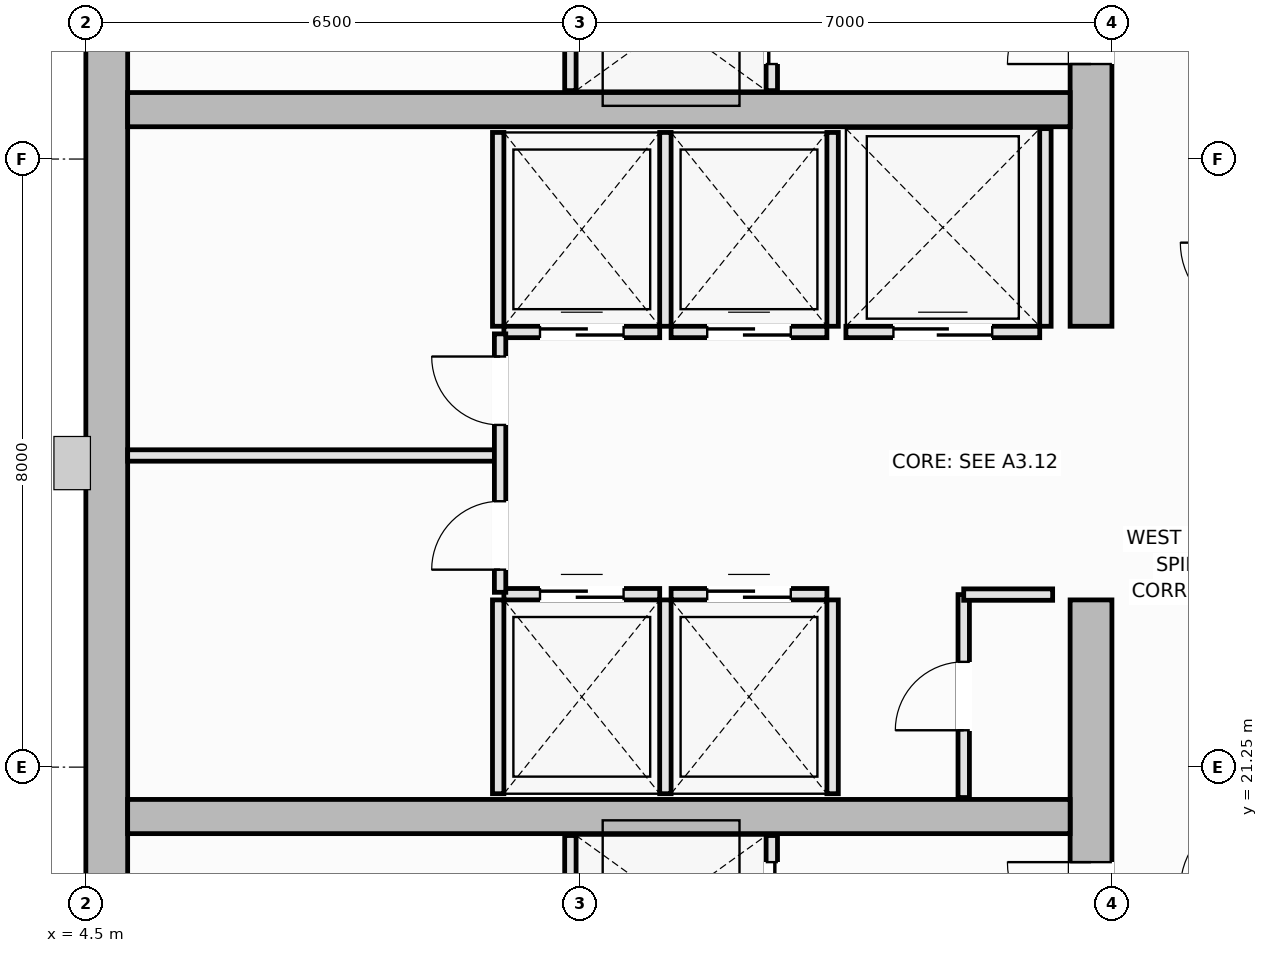
"""IFC4 building model, lengths in metres.
Left out: names, types, materials, properties, quantities, classifications, styles, units other than length and angle.
Written with IfcOpenShell. Run it as: python <this file> out.ifc"""

import sys

from ifc_helpers import new_model, si_unit, direction, frame, frame_2d, origin, place, context, subcontext, project, spatial, rectangle, extrude, element, fill, save


model = new_model("IFC4")
c1 = context("Model", 3, precision=1e-05, world=origin(), true_north=direction((0.0, 1.0)))
c2 = subcontext(c1, "Body", "Model", "MODEL_VIEW")
j1 = project(units=[si_unit("LENGTHUNIT", "METRE"), si_unit("PLANEANGLEUNIT", "RADIAN")], contexts=[c1])
p1 = place(None, origin())
s1 = spatial("IfcSite", under=j1, at=p1, CompositionType="ELEMENT")
p2 = place(p1, origin())
s2 = spatial("IfcBuilding", under=s1, at=p2, CompositionType="ELEMENT")
p3 = place(p2, frame((0.0, 0.0, 191.6)))
s3 = spatial("IfcBuildingStorey", under=s2, at=p3, CompositionType="ELEMENT", Elevation=191.6)
p4 = place(p3, frame((4.775, 14.55, 0.0), z_axis=(0.0, 0.0, 1.0), x_axis=(0.0, 1.0, 0.0)))
e1 = element("IfcWall", 1, at=p4, inside=s3, PredefinedType="SHEAR", context=c2, shape_type="SweptSolid", body=[
    extrude(rectangle(XDim=21.4, YDim=0.55, at=frame_2d((10.7, 0.0))), origin(), (0.0, 0.0, 1.0), 3.55),
])
p5 = place(p3, frame((17.725, 14.55, 0.0), z_axis=(0.0, 0.0, 1.0), x_axis=(0.0, 1.0, 0.0)))
e2 = element("IfcWall", 2, at=p5, inside=s3, PredefinedType="SHEAR", context=c2, shape_type="SweptSolid", body=[
    extrude(rectangle(XDim=8.9, YDim=0.55, at=frame_2d((4.45, 0.0))), origin(), (0.0, 0.0, 1.0), 3.55),
])
p6 = place(p5, frame((4.35, 0.0, 0.0)))
e3 = element("IfcOpeningElement", 3, at=p6, cuts=e2, PredefinedType="OPENING", context=c2, shape_type="SweptSolid", body=[
    extrude(rectangle(XDim=1.1, YDim=2.15, at=frame_2d((0.55, 1.075))), frame((0.0, 0.285, 0.0), z_axis=(0.0, -1.0, 0.0), x_axis=(1.0, 0.0, 0.0)), (0.0, 0.0, 1.0), 0.57),
])
p7 = place(p3, frame((17.725, 27.05, 0.0), z_axis=(0.0, 0.0, 1.0), x_axis=(0.0, 1.0, 0.0)))
e4 = element("IfcWall", 4, at=p7, inside=s3, PredefinedType="SHEAR", context=c2, shape_type="SweptSolid", body=[
    extrude(rectangle(XDim=8.9, YDim=0.55, at=frame_2d((4.45, 0.0))), origin(), (0.0, 0.0, 1.0), 3.55),
])
p8 = place(p7, frame((3.45, 0.0, 0.0)))
e5 = element("IfcOpeningElement", 5, at=p8, cuts=e4, PredefinedType="OPENING", context=c2, shape_type="SweptSolid", body=[
    extrude(rectangle(XDim=1.1, YDim=2.15, at=frame_2d((0.55, 1.075))), frame((0.0, 0.285, 0.0), z_axis=(0.0, -1.0, 0.0), x_axis=(1.0, 0.0, 0.0)), (0.0, 0.0, 1.0), 0.57),
])
for number, where, z_axis, x_axis in (
    (6, (5.05, 20.6, 0.0), (0.0, 0.0, 1.0), (1.0, 0.0, 0.0)),
    (7, (5.05, 29.9, 0.0), (0.0, 0.0, 1.0), (1.0, 0.0, 0.0)),
):
    element("IfcWall", number, at=place(p3, frame(where, z_axis=z_axis, x_axis=x_axis)), inside=s3, PredefinedType="SHEAR", context=c2, shape_type="SweptSolid", body=[
        extrude(rectangle(XDim=12.4, YDim=0.45, at=frame_2d((6.2, 0.0))), origin(), (0.0, 0.0, 1.0), 3.55),
    ])
p9 = place(p3, frame((10.0, 23.525, 0.0), z_axis=(0.0, 0.0, 1.0), x_axis=(1.0, 0.0, 0.0)))
e8 = element("IfcWall", 8, at=p9, inside=s3, PredefinedType="PARTITIONING", context=c2, shape_type="SweptSolid", body=[
    extrude(rectangle(XDim=2.05, YDim=0.15, at=frame_2d((1.025, 0.0))), origin(), (0.0, 0.0, 1.0), 3.37),
])
p10 = place(p9, frame((0.475, 0.0, 0.0)))
e9 = element("IfcOpeningElement", 9, at=p10, cuts=e8, PredefinedType="OPENING", context=c2, shape_type="SweptSolid", body=[
    extrude(rectangle(XDim=1.1, YDim=2.2, at=frame_2d((0.55, 1.1))), frame((0.0, 0.085, 0.0), z_axis=(0.0, -1.0, 0.0), x_axis=(1.0, 0.0, 0.0)), (0.0, 0.0, 1.0), 0.17),
])
for number, where, z_axis, x_axis in (
    (10, (9.925, 20.9, 0.0), (0.0, 0.0, 1.0), (0.0, 1.0, 0.0)),
    (11, (12.125, 20.9, 0.0), (0.0, 0.0, 1.0), (0.0, 1.0, 0.0)),
):
    element("IfcWall", number, at=place(p3, frame(where, z_axis=z_axis, x_axis=x_axis)), inside=s3, PredefinedType="PARTITIONING", context=c2, shape_type="SweptSolid", body=[
        extrude(rectangle(XDim=2.55, YDim=0.15, at=frame_2d((1.275, 0.0))), origin(), (0.0, 0.0, 1.0), 3.37),
    ])
p11 = place(p3, frame((12.2, 23.525, 0.0), z_axis=(0.0, 0.0, 1.0), x_axis=(1.0, 0.0, 0.0)))
e12 = element("IfcWall", 12, at=p11, inside=s3, PredefinedType="PARTITIONING", context=c2, shape_type="SweptSolid", body=[
    extrude(rectangle(XDim=2.05, YDim=0.15, at=frame_2d((1.025, 0.0))), origin(), (0.0, 0.0, 1.0), 3.37),
])
p12 = place(p11, frame((0.475, 0.0, 0.0)))
e13 = element("IfcOpeningElement", 13, at=p12, cuts=e12, PredefinedType="OPENING", context=c2, shape_type="SweptSolid", body=[
    extrude(rectangle(XDim=1.1, YDim=2.2, at=frame_2d((0.55, 1.1))), frame((0.0, 0.085, 0.0), z_axis=(0.0, -1.0, 0.0), x_axis=(1.0, 0.0, 0.0)), (0.0, 0.0, 1.0), 0.17),
])
p13 = place(p3, frame((14.325, 20.9, 0.0), z_axis=(0.0, 0.0, 1.0), x_axis=(0.0, 1.0, 0.0)))
e14 = element("IfcWall", 14, at=p13, inside=s3, PredefinedType="PARTITIONING", context=c2, shape_type="SweptSolid", body=[
    extrude(rectangle(XDim=2.55, YDim=0.15, at=frame_2d((1.275, 0.0))), origin(), (0.0, 0.0, 1.0), 3.37),
])
p14 = place(p3, frame((10.0, 26.975, 0.0), z_axis=(0.0, 0.0, 1.0), x_axis=(1.0, 0.0, 0.0)))
e15 = element("IfcWall", 15, at=p14, inside=s3, PredefinedType="PARTITIONING", context=c2, shape_type="SweptSolid", body=[
    extrude(rectangle(XDim=2.05, YDim=0.15, at=frame_2d((1.025, 0.0))), origin(), (0.0, 0.0, 1.0), 3.37),
])
p15 = place(p14, frame((0.475, 0.0, 0.0)))
e16 = element("IfcOpeningElement", 16, at=p15, cuts=e15, PredefinedType="OPENING", context=c2, shape_type="SweptSolid", body=[
    extrude(rectangle(XDim=1.1, YDim=2.2, at=frame_2d((0.55, 1.1))), frame((0.0, 0.085, 0.0), z_axis=(0.0, -1.0, 0.0), x_axis=(1.0, 0.0, 0.0)), (0.0, 0.0, 1.0), 0.17),
])
for number, where, z_axis, x_axis in (
    (17, (9.925, 27.05, 0.0), (0.0, 0.0, 1.0), (0.0, 1.0, 0.0)),
    (18, (12.125, 27.05, 0.0), (0.0, 0.0, 1.0), (0.0, 1.0, 0.0)),
):
    element("IfcWall", number, at=place(p3, frame(where, z_axis=z_axis, x_axis=x_axis)), inside=s3, PredefinedType="PARTITIONING", context=c2, shape_type="SweptSolid", body=[
        extrude(rectangle(XDim=2.55, YDim=0.15, at=frame_2d((1.275, 0.0))), origin(), (0.0, 0.0, 1.0), 3.37),
    ])
p16 = place(p3, frame((12.2, 26.975, 0.0), z_axis=(0.0, 0.0, 1.0), x_axis=(1.0, 0.0, 0.0)))
e19 = element("IfcWall", 19, at=p16, inside=s3, PredefinedType="PARTITIONING", context=c2, shape_type="SweptSolid", body=[
    extrude(rectangle(XDim=2.05, YDim=0.15, at=frame_2d((1.025, 0.0))), origin(), (0.0, 0.0, 1.0), 3.37),
])
p17 = place(p16, frame((0.475, 0.0, 0.0)))
e20 = element("IfcOpeningElement", 20, at=p17, cuts=e19, PredefinedType="OPENING", context=c2, shape_type="SweptSolid", body=[
    extrude(rectangle(XDim=1.1, YDim=2.2, at=frame_2d((0.55, 1.1))), frame((0.0, 0.085, 0.0), z_axis=(0.0, -1.0, 0.0), x_axis=(1.0, 0.0, 0.0)), (0.0, 0.0, 1.0), 0.17),
])
p18 = place(p3, frame((14.325, 27.05, 0.0), z_axis=(0.0, 0.0, 1.0), x_axis=(0.0, 1.0, 0.0)))
e21 = element("IfcWall", 21, at=p18, inside=s3, PredefinedType="PARTITIONING", context=c2, shape_type="SweptSolid", body=[
    extrude(rectangle(XDim=2.55, YDim=0.15, at=frame_2d((1.275, 0.0))), origin(), (0.0, 0.0, 1.0), 3.37),
])
p19 = place(p3, frame((14.5, 26.975, 0.0), z_axis=(0.0, 0.0, 1.0), x_axis=(1.0, 0.0, 0.0)))
e22 = element("IfcWall", 22, at=p19, inside=s3, PredefinedType="PARTITIONING", context=c2, shape_type="SweptSolid", body=[
    extrude(rectangle(XDim=2.55, YDim=0.15, at=frame_2d((1.275, 0.0))), origin(), (0.0, 0.0, 1.0), 3.37),
])
p20 = place(p19, frame((0.625, 0.0, 0.0)))
e23 = element("IfcOpeningElement", 23, at=p20, cuts=e22, PredefinedType="OPENING", context=c2, shape_type="SweptSolid", body=[
    extrude(rectangle(XDim=1.3, YDim=2.2, at=frame_2d((0.65, 1.1))), frame((0.0, 0.085, 0.0), z_axis=(0.0, -1.0, 0.0), x_axis=(1.0, 0.0, 0.0)), (0.0, 0.0, 1.0), 0.17),
])
p21 = place(p3, frame((17.125, 27.05, 0.0), z_axis=(0.0, 0.0, 1.0), x_axis=(0.0, 1.0, 0.0)))
e24 = element("IfcWall", 24, at=p21, inside=s3, PredefinedType="PARTITIONING", context=c2, shape_type="SweptSolid", body=[
    extrude(rectangle(XDim=2.6, YDim=0.15, at=frame_2d((1.3, 0.0))), origin(), (0.0, 0.0, 1.0), 3.37),
])
p22 = place(p3, frame((10.875, 18.55, 0.0), z_axis=(0.0, 0.0, 1.0), x_axis=(0.0, 1.0, 0.0)))
e25 = element("IfcWall", 25, at=p22, inside=s3, PredefinedType="PARTITIONING", context=c2, shape_type="SweptSolid", body=[
    extrude(rectangle(XDim=1.8, YDim=0.15, at=frame_2d((0.9, 0.0))), origin(), (0.0, 0.0, 1.0), 3.37),
])
p23 = place(p3, frame((13.525, 18.55, 0.0), z_axis=(0.0, 0.0, 1.0), x_axis=(0.0, 1.0, 0.0)))
e26 = element("IfcWall", 26, at=p23, inside=s3, PredefinedType="PARTITIONING", context=c2, shape_type="SweptSolid", body=[
    extrude(rectangle(XDim=1.8, YDim=0.15, at=frame_2d((0.9, 0.0))), origin(), (0.0, 0.0, 1.0), 3.37),
])
p24 = place(p23, frame((0.35, 0.0, 0.0)))
e27 = element("IfcOpeningElement", 27, at=p24, cuts=e26, PredefinedType="OPENING", context=c2, shape_type="SweptSolid", body=[
    extrude(rectangle(XDim=1.1, YDim=2.2, at=frame_2d((0.55, 1.1))), frame((0.0, 0.085, 0.0), z_axis=(0.0, -1.0, 0.0), x_axis=(1.0, 0.0, 0.0)), (0.0, 0.0, 1.0), 0.17),
])
p25 = place(p3, frame((10.875, 30.15, 0.0), z_axis=(0.0, 0.0, 1.0), x_axis=(0.0, 1.0, 0.0)))
e28 = element("IfcWall", 28, at=p25, inside=s3, PredefinedType="PARTITIONING", context=c2, shape_type="SweptSolid", body=[
    extrude(rectangle(XDim=1.8, YDim=0.15, at=frame_2d((0.9, 0.0))), origin(), (0.0, 0.0, 1.0), 3.37),
])
p26 = place(p3, frame((13.525, 30.15, 0.0), z_axis=(0.0, 0.0, 1.0), x_axis=(0.0, 1.0, 0.0)))
e29 = element("IfcWall", 29, at=p26, inside=s3, PredefinedType="PARTITIONING", context=c2, shape_type="SweptSolid", body=[
    extrude(rectangle(XDim=1.8, YDim=0.15, at=frame_2d((0.9, 0.0))), origin(), (0.0, 0.0, 1.0), 3.37),
])
p27 = place(p26, frame((0.35, 0.0, 0.0)))
e30 = element("IfcOpeningElement", 30, at=p27, cuts=e29, PredefinedType="OPENING", context=c2, shape_type="SweptSolid", body=[
    extrude(rectangle(XDim=1.1, YDim=2.2, at=frame_2d((0.55, 1.1))), frame((0.0, 0.085, 0.0), z_axis=(0.0, -1.0, 0.0), x_axis=(1.0, 0.0, 0.0)), (0.0, 0.0, 1.0), 0.17),
])
p28 = place(p3, frame((5.05, 25.35, 0.0), z_axis=(0.0, 0.0, 1.0), x_axis=(1.0, 0.0, 0.0)))
e31 = element("IfcWall", 31, at=p28, inside=s3, PredefinedType="PARTITIONING", context=c2, shape_type="SweptSolid", body=[
    extrude(rectangle(XDim=4.9, YDim=0.15, at=frame_2d((2.45, 0.0))), origin(), (0.0, 0.0, 1.0), 3.37),
])
p29 = place(p3, frame((9.95, 23.55, 0.0), z_axis=(0.0, 0.0, 1.0), x_axis=(0.0, 1.0, 0.0)))
e32 = element("IfcWall", 32, at=p29, inside=s3, PredefinedType="PARTITIONING", context=c2, shape_type="SweptSolid", body=[
    extrude(rectangle(XDim=3.4, YDim=0.15, at=frame_2d((1.7, 0.0))), origin(), (0.0, 0.0, 1.0), 3.37),
])
p30 = place(p29, frame((0.298, 0.0, 0.0)))
e33 = element("IfcOpeningElement", 33, at=p30, cuts=e32, PredefinedType="OPENING", context=c2, shape_type="SweptSolid", body=[
    extrude(rectangle(XDim=0.9, YDim=2.1, at=frame_2d((0.45, 1.05))), frame((0.0, 0.085, 0.0), z_axis=(0.0, -1.0, 0.0), x_axis=(1.0, 0.0, 0.0)), (0.0, 0.0, 1.0), 0.17),
])
p31 = place(p29, frame((2.202, 0.0, 0.0)))
e34 = element("IfcOpeningElement", 34, at=p31, cuts=e32, PredefinedType="OPENING", context=c2, shape_type="SweptSolid", body=[
    extrude(rectangle(XDim=0.9, YDim=2.1, at=frame_2d((0.45, 1.05))), frame((0.0, 0.085, 0.0), z_axis=(0.0, -1.0, 0.0), x_axis=(1.0, 0.0, 0.0)), (0.0, 0.0, 1.0), 0.17),
])
p32 = place(p3, frame((16.05, 20.85, 0.0), z_axis=(0.0, 0.0, 1.0), x_axis=(0.0, 1.0, 0.0)))
e35 = element("IfcWall", 35, at=p32, inside=s3, PredefinedType="PARTITIONING", context=c2, shape_type="SweptSolid", body=[
    extrude(rectangle(XDim=2.67, YDim=0.15, at=frame_2d((1.335, 0.0))), origin(), (0.0, 0.0, 1.0), 3.37),
])
p33 = place(p32, frame((0.885, 0.0, 0.0)))
e36 = element("IfcOpeningElement", 36, at=p33, cuts=e35, PredefinedType="OPENING", context=c2, shape_type="SweptSolid", body=[
    extrude(rectangle(XDim=0.9, YDim=2.1, at=frame_2d((0.45, 1.05))), frame((0.0, 0.085, 0.0), z_axis=(0.0, -1.0, 0.0), x_axis=(1.0, 0.0, 0.0)), (0.0, 0.0, 1.0), 0.17),
])
p34 = place(p3, frame((16.05, 23.52, 0.0), z_axis=(0.0, 0.0, 1.0), x_axis=(1.0, 0.0, 0.0)))
e37 = element("IfcWall", 37, at=p34, inside=s3, PredefinedType="PARTITIONING", context=c2, shape_type="SweptSolid", body=[
    extrude(rectangle(XDim=1.17, YDim=0.15, at=frame_2d((0.585, 0.0))), origin(), (0.0, 0.0, 1.0), 3.37),
])
p35 = place(p10, origin())
e38 = element("IfcDoor", 38, at=p35, inside=s3, OperationType="DOUBLE_DOOR_SLIDING", PredefinedType="DOOR", context=c2, shape_type="SweptSolid", body=[
    extrude(rectangle(XDim=1.1, YDim=2.2, at=frame_2d((0.55, 1.1))), frame((0.0, 0.025, 0.0), z_axis=(0.0, -1.0, 0.0), x_axis=(1.0, 0.0, 0.0)), (0.0, 0.0, 1.0), 0.05),
])
fill(e9, e38)
p36 = place(p12, origin())
e39 = element("IfcDoor", 39, at=p36, inside=s3, OperationType="DOUBLE_DOOR_SLIDING", PredefinedType="DOOR", context=c2, shape_type="SweptSolid", body=[
    extrude(rectangle(XDim=1.1, YDim=2.2, at=frame_2d((0.55, 1.1))), frame((0.0, 0.025, 0.0), z_axis=(0.0, -1.0, 0.0), x_axis=(1.0, 0.0, 0.0)), (0.0, 0.0, 1.0), 0.05),
])
fill(e13, e39)
p37 = place(p15, origin())
e40 = element("IfcDoor", 40, at=p37, inside=s3, OperationType="DOUBLE_DOOR_SLIDING", PredefinedType="DOOR", context=c2, shape_type="SweptSolid", body=[
    extrude(rectangle(XDim=1.1, YDim=2.2, at=frame_2d((0.55, 1.1))), frame((0.0, 0.025, 0.0), z_axis=(0.0, -1.0, 0.0), x_axis=(1.0, 0.0, 0.0)), (0.0, 0.0, 1.0), 0.05),
])
fill(e16, e40)
p38 = place(p17, origin())
e41 = element("IfcDoor", 41, at=p38, inside=s3, OperationType="DOUBLE_DOOR_SLIDING", PredefinedType="DOOR", context=c2, shape_type="SweptSolid", body=[
    extrude(rectangle(XDim=1.1, YDim=2.2, at=frame_2d((0.55, 1.1))), frame((0.0, 0.025, 0.0), z_axis=(0.0, -1.0, 0.0), x_axis=(1.0, 0.0, 0.0)), (0.0, 0.0, 1.0), 0.05),
])
fill(e20, e41)
p39 = place(p20, origin())
e42 = element("IfcDoor", 42, at=p39, inside=s3, OperationType="DOUBLE_DOOR_SLIDING", PredefinedType="DOOR", context=c2, shape_type="SweptSolid", body=[
    extrude(rectangle(XDim=1.3, YDim=2.2, at=frame_2d((0.65, 1.1))), frame((0.0, 0.025, 0.0), z_axis=(0.0, -1.0, 0.0), x_axis=(1.0, 0.0, 0.0)), (0.0, 0.0, 1.0), 0.05),
])
fill(e23, e42)
p40 = place(p24, origin())
e43 = element("IfcDoor", 43, at=p40, inside=s3, OperationType="DOUBLE_DOOR_SLIDING", PredefinedType="DOOR", context=c2, shape_type="SweptSolid", body=[
    extrude(rectangle(XDim=1.1, YDim=2.2, at=frame_2d((0.55, 1.1))), frame((0.0, 0.025, 0.0), z_axis=(0.0, -1.0, 0.0), x_axis=(1.0, 0.0, 0.0)), (0.0, 0.0, 1.0), 0.05),
])
fill(e27, e43)
p41 = place(p27, origin())
e44 = element("IfcDoor", 44, at=p41, inside=s3, OperationType="DOUBLE_DOOR_SLIDING", PredefinedType="DOOR", context=c2, shape_type="SweptSolid", body=[
    extrude(rectangle(XDim=1.1, YDim=2.2, at=frame_2d((0.55, 1.1))), frame((0.0, 0.025, 0.0), z_axis=(0.0, -1.0, 0.0), x_axis=(1.0, 0.0, 0.0)), (0.0, 0.0, 1.0), 0.05),
])
fill(e30, e44)
p42 = place(p6, origin())
e45 = element("IfcDoor", 45, at=p42, inside=s3, OperationType="SINGLE_SWING_RIGHT", PredefinedType="DOOR", context=c2, shape_type="SweptSolid", body=[
    extrude(rectangle(XDim=1.1, YDim=2.15, at=frame_2d((0.55, 1.075))), frame((0.0, 0.025, 0.0), z_axis=(0.0, -1.0, 0.0), x_axis=(1.0, 0.0, 0.0)), (0.0, 0.0, 1.0), 0.05),
])
fill(e3, e45)
p43 = place(p8, origin())
e46 = element("IfcDoor", 46, at=p43, inside=s3, OperationType="SINGLE_SWING_LEFT", PredefinedType="DOOR", context=c2, shape_type="SweptSolid", body=[
    extrude(rectangle(XDim=1.1, YDim=2.15, at=frame_2d((0.55, 1.075))), frame((0.0, 0.025, 0.0), z_axis=(0.0, -1.0, 0.0), x_axis=(1.0, 0.0, 0.0)), (0.0, 0.0, 1.0), 0.05),
])
fill(e5, e46)
p44 = place(p30, origin())
e47 = element("IfcDoor", 47, at=p44, inside=s3, OperationType="SINGLE_SWING_LEFT", PredefinedType="DOOR", context=c2, shape_type="SweptSolid", body=[
    extrude(rectangle(XDim=0.9, YDim=2.1, at=frame_2d((0.45, 1.05))), frame((0.0, 0.025, 0.0), z_axis=(0.0, -1.0, 0.0), x_axis=(1.0, 0.0, 0.0)), (0.0, 0.0, 1.0), 0.05),
])
fill(e33, e47)
p45 = place(p31, origin())
e48 = element("IfcDoor", 48, at=p45, inside=s3, OperationType="SINGLE_SWING_RIGHT", PredefinedType="DOOR", context=c2, shape_type="SweptSolid", body=[
    extrude(rectangle(XDim=0.9, YDim=2.1, at=frame_2d((0.45, 1.05))), frame((0.0, 0.025, 0.0), z_axis=(0.0, -1.0, 0.0), x_axis=(1.0, 0.0, 0.0)), (0.0, 0.0, 1.0), 0.05),
])
fill(e34, e48)
p46 = place(p33, origin())
e49 = element("IfcDoor", 49, at=p46, inside=s3, OperationType="SINGLE_SWING_LEFT", PredefinedType="DOOR", context=c2, shape_type="SweptSolid", body=[
    extrude(rectangle(XDim=0.9, YDim=2.1, at=frame_2d((0.45, 1.05))), frame((0.0, 0.025, 0.0), z_axis=(0.0, -1.0, 0.0), x_axis=(1.0, 0.0, 0.0)), (0.0, 0.0, 1.0), 0.05),
])
fill(e36, e49)
save(model, sys.argv[1])
